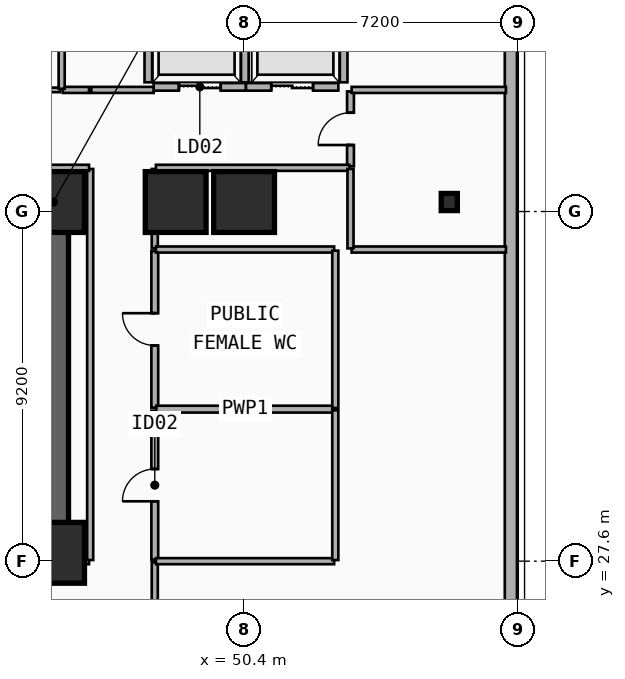
"""IFC4 building model, lengths in metres.
Left out: names, types, materials, properties, quantities, classifications, styles, units other than length and angle.
Written with IfcOpenShell. Run it as: python <this file> out.ifc"""

import sys

from ifc_helpers import new_model, si_unit, direction, frame, frame_2d, origin, origin_2d, place, context, subcontext, project, spatial, rectangle, i_section, extrude, element, fill, save


model = new_model("IFC4")
c1 = context("Model", 3, precision=1e-05, world=origin(), true_north=direction((0.0, 1.0)))
c2 = subcontext(c1, "Body", "Model", "MODEL_VIEW")
j1 = project(units=[si_unit("LENGTHUNIT", "METRE"), si_unit("PLANEANGLEUNIT", "RADIAN")], contexts=[c1])
p1 = place(None, origin())
s1 = spatial("IfcSite", under=j1, at=p1, CompositionType="ELEMENT")
p2 = place(p1, origin())
s2 = spatial("IfcBuilding", under=s1, at=p2, CompositionType="ELEMENT")
p3 = place(p2, frame((0.0, 0.0, 24.2)))
s3 = spatial("IfcBuildingStorey", under=s2, at=p3, CompositionType="ELEMENT", Elevation=24.2)
p4 = place(p3, frame((12.15, 37.05, 0.0), z_axis=(0.0, 0.0, 1.0), x_axis=(1.0, 0.0, 0.0)))
e1 = element("IfcWall", 1, at=p4, inside=s3, PredefinedType="SHEAR", context=c2, shape_type="SweptSolid", body=[
    extrude(rectangle(XDim=33.23, YDim=0.8, at=frame_2d((16.615, 0.0))), origin(), (0.0, 0.0, 1.0), 4.8),
])
p5 = place(p3, frame((45.38, 27.82, 0.0), z_axis=(0.0, 0.0, 1.0), x_axis=(-1.0, 0.0, 0.0)))
e2 = element("IfcWall", 2, at=p5, inside=s3, PredefinedType="SHEAR", context=c2, shape_type="SweptSolid", body=[
    extrude(rectangle(XDim=12.23, YDim=0.8, at=frame_2d((6.115, 0.0))), origin(), (0.0, 0.0, 1.0), 4.8),
])
p6 = place(p5, frame((9.93, 0.0, 0.0)))
e3 = element("IfcOpeningElement", 3, at=p6, cuts=e2, PredefinedType="OPENING", context=c2, shape_type="SweptSolid", body=[
    extrude(rectangle(XDim=1.1, YDim=2.15, at=frame_2d((0.55, 1.075))), frame((0.0, 0.41, 0.0), z_axis=(0.0, -1.0, 0.0), x_axis=(1.0, 0.0, 0.0)), (0.0, 0.0, 1.0), 0.82),
])
p7 = place(p5, frame((6.23, 0.0, 0.0)))
e4 = element("IfcOpeningElement", 4, at=p7, cuts=e2, PredefinedType="OPENING", context=c2, shape_type="SweptSolid", body=[
    extrude(rectangle(XDim=1.1, YDim=2.15, at=frame_2d((0.55, 1.075))), frame((0.0, 0.41, 0.0), z_axis=(0.0, -1.0, 0.0), x_axis=(1.0, 0.0, 0.0)), (0.0, 0.0, 1.0), 0.82),
])
p8 = place(p3, frame((45.38, 28.22, 0.0), z_axis=(0.0, 0.0, 1.0), x_axis=(0.0, 1.0, 0.0)))
e5 = element("IfcWall", 5, at=p8, inside=s3, PredefinedType="SHEAR", context=c2, shape_type="SweptSolid", body=[
    extrude(rectangle(XDim=8.43, YDim=0.8, at=frame_2d((4.215, 0.0))), origin(), (0.0, 0.0, 1.0), 4.8),
])
for number, where, z_axis, x_axis in (
    (6, (45.4, 27.82, 0.0), (0.0, 0.0, 1.0), (1.0, 0.0, 0.0)),
    (7, (45.4, 37.05, 0.0), (0.0, 0.0, 1.0), (1.0, 0.0, 0.0)),
    (8, (48.6, 37.05, 0.0), (0.0, 0.0, 1.0), (1.0, 0.0, 0.0)),
    (9, (50.4, 37.05, 0.0), (0.0, 0.0, 1.0), (1.0, 0.0, 0.0)),
):
    element("IfcColumn", number, at=place(p3, frame(where, z_axis=z_axis, x_axis=x_axis)), inside=s3, PredefinedType="COLUMN", context=c2, shape_type="SweptSolid", body=[
        extrude(rectangle(XDim=1.6, YDim=1.6, at=origin_2d()), origin(), (0.0, 0.0, 1.0), 4.8),
    ])
p9 = place(p3, frame((55.8, 37.05, 0.0), z_axis=(0.0, 0.0, 1.0), x_axis=(1.0, 0.0, 0.0)))
e10 = element("IfcColumn", 10, at=p9, inside=s3, PredefinedType="COLUMN", context=c2, shape_type="SweptSolid", body=[
    extrude(i_section(OverallWidth=0.424, OverallDepth=0.45, WebThickness=0.041, FlangeThickness=0.065, FilletRadius=0.015, at=origin_2d()), origin(), (0.0, 0.0, 1.0), 4.8),
])
p10 = place(p3, frame((57.42, 41.6, 0.0), z_axis=(0.0, 0.0, 1.0), x_axis=(0.0, -1.0, 0.0)))
e11 = element("IfcWall", 11, at=p10, inside=s3, PredefinedType="SOLIDWALL", context=c2, shape_type="SweptSolid", body=[
    extrude(rectangle(XDim=34.4, YDim=0.32, at=frame_2d((17.2, 0.0))), origin(), (0.0, 0.0, 1.0), 4.48),
])
p11 = place(p10, frame((20.727, 0.0, 0.9)))
e12 = element("IfcOpeningElement", 12, at=p11, cuts=e11, PredefinedType="OPENING", context=c2, shape_type="SweptSolid", body=[
    extrude(rectangle(XDim=2.4, YDim=1.8, at=frame_2d((1.2, 0.9))), frame((0.0, 0.17, 0.0), z_axis=(0.0, -1.0, 0.0), x_axis=(1.0, 0.0, 0.0)), (0.0, 0.0, 1.0), 0.34),
])
p12 = place(p10, frame((27.403, 0.0, 0.9)))
e13 = element("IfcOpeningElement", 13, at=p12, cuts=e11, PredefinedType="OPENING", context=c2, shape_type="SweptSolid", body=[
    extrude(rectangle(XDim=2.4, YDim=1.8, at=frame_2d((1.2, 0.9))), frame((0.0, 0.17, 0.0), z_axis=(0.0, -1.0, 0.0), x_axis=(1.0, 0.0, 0.0)), (0.0, 0.0, 1.0), 0.34),
])
p13 = place(p3, frame((48.02, 40.08, 0.0), z_axis=(0.0, 0.0, 1.0), x_axis=(1.0, 0.0, 0.0)))
e14 = element("IfcWall", 14, at=p13, inside=s3, PredefinedType="PARTITIONING", context=c2, shape_type="SweptSolid", body=[
    extrude(rectangle(XDim=2.43, YDim=0.2, at=frame_2d((1.215, 0.0))), origin(), (0.0, 0.0, 1.0), 4.48),
])
p14 = place(p13, frame((0.665, 0.0, 0.0)))
e15 = element("IfcOpeningElement", 15, at=p14, cuts=e14, PredefinedType="OPENING", context=c2, shape_type="SweptSolid", body=[
    extrude(rectangle(XDim=1.1, YDim=2.15, at=frame_2d((0.55, 1.075))), frame((0.0, 0.11, 0.0), z_axis=(0.0, -1.0, 0.0), x_axis=(1.0, 0.0, 0.0)), (0.0, 0.0, 1.0), 0.22),
])
for number, where, z_axis, x_axis in (
    (16, (47.88, 40.2, 0.0), (0.0, 0.0, 1.0), (0.0, 1.0, 0.0)),
    (17, (50.42, 40.2, 0.0), (0.0, 0.0, 1.0), (0.0, 1.0, 0.0)),
):
    element("IfcWall", number, at=place(p3, frame(where, z_axis=z_axis, x_axis=x_axis)), inside=s3, PredefinedType="PARTITIONING", context=c2, shape_type="SweptSolid", body=[
        extrude(rectangle(XDim=2.6, YDim=0.2, at=frame_2d((1.3, 0.0))), origin(), (0.0, 0.0, 1.0), 4.48),
    ])
p15 = place(p3, frame((50.45, 40.08, 0.0), z_axis=(0.0, 0.0, 1.0), x_axis=(1.0, 0.0, 0.0)))
e18 = element("IfcWall", 18, at=p15, inside=s3, PredefinedType="PARTITIONING", context=c2, shape_type="SweptSolid", body=[
    extrude(rectangle(XDim=2.43, YDim=0.2, at=frame_2d((1.215, 0.0))), origin(), (0.0, 0.0, 1.0), 4.48),
])
p16 = place(p15, frame((0.665, 0.0, 0.0)))
e19 = element("IfcOpeningElement", 19, at=p16, cuts=e18, PredefinedType="OPENING", context=c2, shape_type="SweptSolid", body=[
    extrude(rectangle(XDim=1.1, YDim=2.15, at=frame_2d((0.55, 1.075))), frame((0.0, 0.11, 0.0), z_axis=(0.0, -1.0, 0.0), x_axis=(1.0, 0.0, 0.0)), (0.0, 0.0, 1.0), 0.22),
])
p17 = place(p3, frame((53.02, 40.2, 0.0), z_axis=(0.0, 0.0, 1.0), x_axis=(0.0, 1.0, 0.0)))
e20 = element("IfcWall", 20, at=p17, inside=s3, PredefinedType="PARTITIONING", context=c2, shape_type="SweptSolid", body=[
    extrude(rectangle(XDim=2.6, YDim=0.2, at=frame_2d((1.3, 0.0))), origin(), (0.0, 0.0, 1.0), 4.48),
])
p18 = place(p3, frame((48.05, 27.64, 0.0), z_axis=(0.0, 0.0, 1.0), x_axis=(0.0, 1.0, 0.0)))
e21 = element("IfcWall", 21, at=p18, inside=s3, PredefinedType="PLUMBINGWALL", context=c2, shape_type="SweptSolid", body=[
    extrude(rectangle(XDim=3.92, YDim=0.18, at=frame_2d((1.96, 0.0))), origin(), (0.0, 0.0, 1.0), 4.48),
])
p19 = place(p18, frame((1.535, 0.0, 0.0)))
e22 = element("IfcOpeningElement", 22, at=p19, cuts=e21, PredefinedType="OPENING", context=c2, shape_type="SweptSolid", body=[
    extrude(rectangle(XDim=0.85, YDim=2.1, at=frame_2d((0.425, 1.05))), frame((0.0, 0.1, 0.0), z_axis=(0.0, -1.0, 0.0), x_axis=(1.0, 0.0, 0.0)), (0.0, 0.0, 1.0), 0.2),
])
p20 = place(p3, frame((48.05, 31.64, 0.0), z_axis=(0.0, 0.0, 1.0), x_axis=(0.0, 1.0, 0.0)))
e23 = element("IfcWall", 23, at=p20, inside=s3, PredefinedType="PLUMBINGWALL", context=c2, shape_type="SweptSolid", body=[
    extrude(rectangle(XDim=4.12, YDim=0.18, at=frame_2d((2.06, 0.0))), origin(), (0.0, 0.0, 1.0), 4.48),
])
p21 = place(p20, frame((1.635, 0.0, 0.0)))
e24 = element("IfcOpeningElement", 24, at=p21, cuts=e23, PredefinedType="OPENING", context=c2, shape_type="SweptSolid", body=[
    extrude(rectangle(XDim=0.85, YDim=2.1, at=frame_2d((0.425, 1.05))), frame((0.0, 0.1, 0.0), z_axis=(0.0, -1.0, 0.0), x_axis=(1.0, 0.0, 0.0)), (0.0, 0.0, 1.0), 0.2),
])
p22 = place(p3, frame((12.04, 40.0, 0.0), z_axis=(0.0, 0.0, 1.0), x_axis=(1.0, 0.0, 0.0)))
e25 = element("IfcWall", 25, at=p22, inside=s3, PredefinedType="PARTITIONING", context=c2, shape_type="SweptSolid", body=[
    extrude(rectangle(XDim=33.52, YDim=0.12, at=frame_2d((16.76, 0.0))), origin(), (0.0, 0.0, 1.0), 3.81),
])
p23 = place(p22, frame((16.31, 0.0, 0.0)))
e26 = element("IfcOpeningElement", 26, at=p23, cuts=e25, PredefinedType="OPENING", context=c2, shape_type="SweptSolid", body=[
    extrude(rectangle(XDim=0.9, YDim=2.1, at=frame_2d((0.45, 1.05))), frame((0.0, 0.07, 0.0), z_axis=(0.0, -1.0, 0.0), x_axis=(1.0, 0.0, 0.0)), (0.0, 0.0, 1.0), 0.14),
])
p24 = place(p3, frame((53.2, 37.99, 0.0), z_axis=(0.0, 0.0, 1.0), x_axis=(0.0, 1.0, 0.0)))
e27 = element("IfcWall", 27, at=p24, inside=s3, PredefinedType="PLUMBINGWALL", context=c2, shape_type="SweptSolid", body=[
    extrude(rectangle(XDim=1.97, YDim=0.18, at=frame_2d((0.985, 0.0))), origin(), (0.0, 0.0, 1.0), 4.48),
])
p25 = place(p24, frame((0.56, 0.0, 0.0)))
e28 = element("IfcOpeningElement", 28, at=p25, cuts=e27, PredefinedType="OPENING", context=c2, shape_type="SweptSolid", body=[
    extrude(rectangle(XDim=0.85, YDim=2.1, at=frame_2d((0.425, 1.05))), frame((0.0, 0.1, 0.0), z_axis=(0.0, -1.0, 0.0), x_axis=(1.0, 0.0, 0.0)), (0.0, 0.0, 1.0), 0.2),
])
p26 = place(p3, frame((48.09, 31.6, 0.0), z_axis=(0.0, 0.0, 1.0), x_axis=(1.0, 0.0, 0.0)))
e29 = element("IfcWall", 29, at=p26, inside=s3, PredefinedType="PLUMBINGWALL", context=c2, shape_type="SweptSolid", body=[
    extrude(rectangle(XDim=4.67, YDim=0.18, at=frame_2d((2.335, 0.0))), origin(), (0.0, 0.0, 1.0), 4.48),
])
p27 = place(p3, frame((45.41, 27.6, 0.0), z_axis=(0.0, 0.0, 1.0), x_axis=(1.0, 0.0, 0.0)))
e30 = element("IfcWall", 30, at=p27, inside=s3, PredefinedType="PARTITIONING", context=c2, shape_type="SweptSolid", body=[
    extrude(rectangle(XDim=0.91, YDim=0.16, at=frame_2d((0.455, 0.0))), origin(), (0.0, 0.0, 1.0), 3.452),
])
p28 = place(p3, frame((48.05, 25.48, 0.0), z_axis=(0.0, 0.0, 1.0), x_axis=(0.0, 1.0, 0.0)))
e31 = element("IfcWall", 31, at=p28, inside=s3, PredefinedType="PARTITIONING", context=c2, shape_type="SweptSolid", body=[
    extrude(rectangle(XDim=2.09, YDim=0.16, at=frame_2d((1.045, 0.0))), origin(), (0.0, 0.0, 1.0), 4.48),
])
p29 = place(p3, frame((46.38, 40.0, 0.0), z_axis=(0.0, 0.0, 1.0), x_axis=(1.0, 0.0, 0.0)))
e32 = element("IfcWall", 32, at=p29, inside=s3, PredefinedType="PARTITIONING", context=c2, shape_type="SweptSolid", body=[
    extrude(rectangle(XDim=1.64, YDim=0.16, at=frame_2d((0.82, 0.0))), origin(), (0.0, 0.0, 1.0), 4.48),
])
p30 = place(p3, frame((46.35, 27.63, 0.0), z_axis=(0.0, 0.0, 1.0), x_axis=(0.0, 1.0, 0.0)))
e33 = element("IfcWall", 33, at=p30, inside=s3, PredefinedType="PARTITIONING", context=c2, shape_type="SweptSolid", body=[
    extrude(rectangle(XDim=10.29, YDim=0.16, at=frame_2d((5.145, 0.0))), origin(), (0.0, 0.0, 1.0), 4.48),
])
p31 = place(p3, frame((48.05, 35.83, 0.0), z_axis=(0.0, 0.0, 1.0), x_axis=(0.0, 1.0, 0.0)))
e34 = element("IfcWall", 34, at=p31, inside=s3, PredefinedType="PARTITIONING", context=c2, shape_type="SweptSolid", body=[
    extrude(rectangle(XDim=2.09, YDim=0.16, at=frame_2d((1.045, 0.0))), origin(), (0.0, 0.0, 1.0), 4.48),
])
p32 = place(p3, frame((11.28, 37.95, 0.0), z_axis=(0.0, 0.0, 1.0), x_axis=(1.0, 0.0, 0.0)))
e35 = element("IfcWall", 35, at=p32, inside=s3, PredefinedType="PARTITIONING", context=c2, shape_type="SweptSolid", body=[
    extrude(rectangle(XDim=35.04, YDim=0.16, at=frame_2d((17.52, 0.0))), origin(), (0.0, 0.0, 1.0), 3.81),
])
p33 = place(p3, frame((45.63, 40.0, 0.0), z_axis=(0.0, 0.0, 1.0), x_axis=(1.0, 0.0, 0.0)))
e36 = element("IfcWall", 36, at=p33, inside=s3, PredefinedType="PARTITIONING", context=c2, shape_type="SweptSolid", body=[
    extrude(rectangle(XDim=0.69, YDim=0.16, at=frame_2d((0.345, 0.0))), origin(), (0.0, 0.0, 1.0), 3.81),
])
p34 = place(p3, frame((48.08, 37.95, 0.0), z_axis=(0.0, 0.0, 1.0), x_axis=(1.0, 0.0, 0.0)))
e37 = element("IfcWall", 37, at=p34, inside=s3, PredefinedType="PARTITIONING", context=c2, shape_type="SweptSolid", body=[
    extrude(rectangle(XDim=5.09, YDim=0.16, at=frame_2d((2.545, 0.0))), origin(), (0.0, 0.0, 1.0), 4.48),
])
p35 = place(p3, frame((48.08, 27.6, 0.0), z_axis=(0.0, 0.0, 1.0), x_axis=(1.0, 0.0, 0.0)))
e38 = element("IfcWall", 38, at=p35, inside=s3, PredefinedType="PARTITIONING", context=c2, shape_type="SweptSolid", body=[
    extrude(rectangle(XDim=4.69, YDim=0.16, at=frame_2d((2.345, 0.0))), origin(), (0.0, 0.0, 1.0), 4.48),
])
p36 = place(p3, frame((52.8, 27.63, 0.0), z_axis=(0.0, 0.0, 1.0), x_axis=(0.0, 1.0, 0.0)))
e39 = element("IfcWall", 39, at=p36, inside=s3, PredefinedType="PARTITIONING", context=c2, shape_type="SweptSolid", body=[
    extrude(rectangle(XDim=3.94, YDim=0.16, at=frame_2d((1.97, 0.0))), origin(), (0.0, 0.0, 1.0), 4.48),
])
p37 = place(p3, frame((48.08, 35.8, 0.0), z_axis=(0.0, 0.0, 1.0), x_axis=(1.0, 0.0, 0.0)))
e40 = element("IfcWall", 40, at=p37, inside=s3, PredefinedType="PARTITIONING", context=c2, shape_type="SweptSolid", body=[
    extrude(rectangle(XDim=4.69, YDim=0.16, at=frame_2d((2.345, 0.0))), origin(), (0.0, 0.0, 1.0), 4.48),
])
p38 = place(p3, frame((52.8, 31.63, 0.0), z_axis=(0.0, 0.0, 1.0), x_axis=(0.0, 1.0, 0.0)))
e41 = element("IfcWall", 41, at=p38, inside=s3, PredefinedType="PARTITIONING", context=c2, shape_type="SweptSolid", body=[
    extrude(rectangle(XDim=4.14, YDim=0.16, at=frame_2d((2.07, 0.0))), origin(), (0.0, 0.0, 1.0), 4.48),
])
for number, where, z_axis, x_axis in (
    (42, (53.23, 35.8, 0.0), (0.0, 0.0, 1.0), (1.0, 0.0, 0.0)),
    (43, (53.23, 40.0, 0.0), (0.0, 0.0, 1.0), (1.0, 0.0, 0.0)),
):
    element("IfcWall", number, at=place(p3, frame(where, z_axis=z_axis, x_axis=x_axis)), inside=s3, PredefinedType="PARTITIONING", context=c2, shape_type="SweptSolid", body=[
        extrude(rectangle(XDim=4.06, YDim=0.16, at=frame_2d((2.03, 0.0))), origin(), (0.0, 0.0, 1.0), 4.48),
    ])
p39 = place(p3, frame((53.2, 35.83, 0.0), z_axis=(0.0, 0.0, 1.0), x_axis=(0.0, 1.0, 0.0)))
e44 = element("IfcWall", 44, at=p39, inside=s3, PredefinedType="PARTITIONING", context=c2, shape_type="SweptSolid", body=[
    extrude(rectangle(XDim=2.09, YDim=0.16, at=frame_2d((1.045, 0.0))), origin(), (0.0, 0.0, 1.0), 4.48),
])
p40 = place(p3, frame((45.6, 40.03, 0.0), z_axis=(0.0, 0.0, 1.0), x_axis=(0.0, 1.0, 0.0)))
e45 = element("IfcWall", 45, at=p40, inside=s3, PredefinedType="PARTITIONING", context=c2, shape_type="SweptSolid", body=[
    extrude(rectangle(XDim=4.86, YDim=0.16, at=frame_2d((2.43, 0.0))), origin(), (0.0, 0.0, 1.0), 3.81),
])
p41 = place(p14, origin())
e46 = element("IfcDoor", 46, at=p41, inside=s3, OperationType="DOUBLE_DOOR_SLIDING", PredefinedType="DOOR", context=c2, shape_type="SweptSolid", body=[
    extrude(rectangle(XDim=1.1, YDim=2.15, at=frame_2d((0.55, 1.075))), frame((0.0, 0.025, 0.0), z_axis=(0.0, -1.0, 0.0), x_axis=(1.0, 0.0, 0.0)), (0.0, 0.0, 1.0), 0.05),
])
fill(e15, e46)
p42 = place(p16, origin())
e47 = element("IfcDoor", 47, at=p42, inside=s3, OperationType="DOUBLE_DOOR_SLIDING", PredefinedType="DOOR", context=c2, shape_type="SweptSolid", body=[
    extrude(rectangle(XDim=1.1, YDim=2.15, at=frame_2d((0.55, 1.075))), frame((0.0, 0.025, 0.0), z_axis=(0.0, -1.0, 0.0), x_axis=(1.0, 0.0, 0.0)), (0.0, 0.0, 1.0), 0.05),
])
fill(e19, e47)
p43 = place(p19, origin())
e48 = element("IfcDoor", 48, at=p43, inside=s3, OperationType="SINGLE_SWING_LEFT", PredefinedType="DOOR", context=c2, shape_type="SweptSolid", body=[
    extrude(rectangle(XDim=0.85, YDim=2.1, at=frame_2d((0.425, 1.05))), frame((0.0, 0.025, 0.0), z_axis=(0.0, -1.0, 0.0), x_axis=(1.0, 0.0, 0.0)), (0.0, 0.0, 1.0), 0.05),
])
fill(e22, e48)
p44 = place(p21, origin())
e49 = element("IfcDoor", 49, at=p44, inside=s3, OperationType="SINGLE_SWING_RIGHT", PredefinedType="DOOR", context=c2, shape_type="SweptSolid", body=[
    extrude(rectangle(XDim=0.85, YDim=2.1, at=frame_2d((0.425, 1.05))), frame((0.0, 0.025, 0.0), z_axis=(0.0, -1.0, 0.0), x_axis=(1.0, 0.0, 0.0)), (0.0, 0.0, 1.0), 0.05),
])
fill(e24, e49)
p45 = place(p25, origin())
e50 = element("IfcDoor", 50, at=p45, inside=s3, OperationType="SINGLE_SWING_LEFT", PredefinedType="DOOR", context=c2, shape_type="SweptSolid", body=[
    extrude(rectangle(XDim=0.85, YDim=2.1, at=frame_2d((0.425, 1.05))), frame((0.0, 0.025, 0.0), z_axis=(0.0, -1.0, 0.0), x_axis=(1.0, 0.0, 0.0)), (0.0, 0.0, 1.0), 0.05),
])
fill(e28, e50)
save(model, sys.argv[1])
